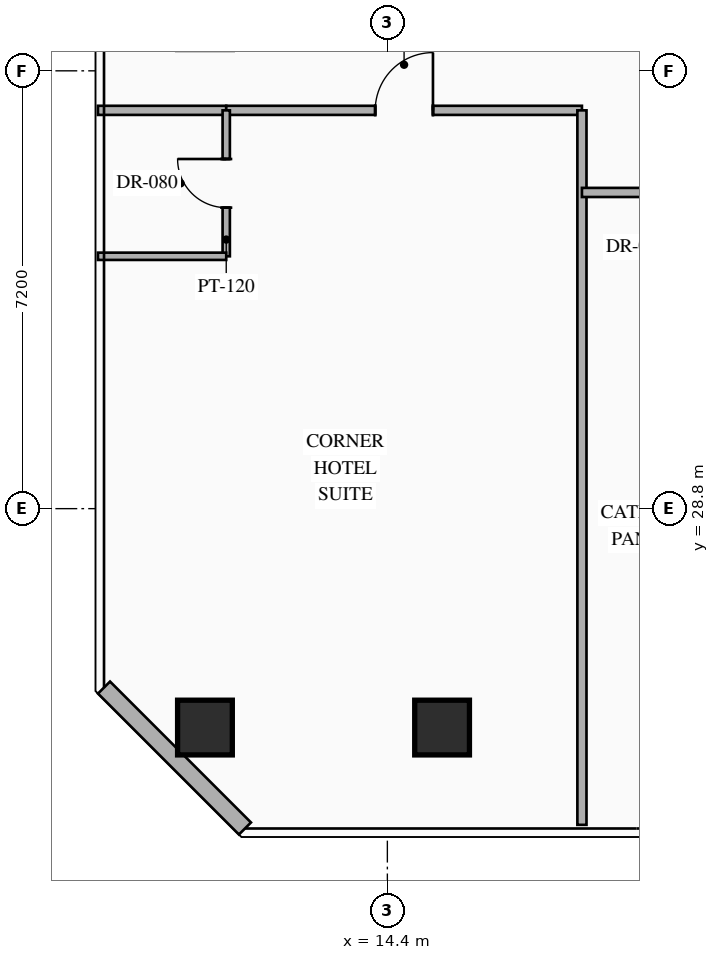
"""IFC4 building model, lengths in metres.
Left out: names, types, materials, properties, quantities, classifications, styles, units other than length and angle.
Written with IfcOpenShell. Run it as: python <this file> out.ifc"""

import sys

from ifc_helpers import new_model, si_unit, direction, frame, frame_2d, origin, origin_2d, place, context, subcontext, project, spatial, rectangle, hollow_rectangle, extrude, element, fill, save


model = new_model("IFC4")
c1 = context("Model", 3, precision=1e-05, world=origin(), true_north=direction((0.0, 1.0)))
c2 = subcontext(c1, "Body", "Model", "MODEL_VIEW")
j1 = project(units=[si_unit("LENGTHUNIT", "METRE"), si_unit("PLANEANGLEUNIT", "RADIAN")], contexts=[c1])
p1 = place(None, origin())
s1 = spatial("IfcSite", under=j1, at=p1, CompositionType="ELEMENT")
p2 = place(p1, origin())
s2 = spatial("IfcBuilding", under=s1, at=p2, CompositionType="ELEMENT")
p3 = place(p2, frame((0.0, 0.0, 84.65)))
s3 = spatial("IfcBuildingStorey", under=s2, at=p3, CompositionType="ELEMENT", Elevation=84.65)
for number, where, z_axis, x_axis in (
    (1, (11.4, 25.2, 0.0), (0.0, 0.0, 1.0), (1.0, 0.0, 0.0)),
    (2, (15.3, 25.2, 0.0), (0.0, 0.0, 1.0), (1.0, 0.0, 0.0)),
):
    element("IfcColumn", number, at=place(p3, frame(where, z_axis=z_axis, x_axis=x_axis)), inside=s3, PredefinedType="COLUMN", context=c2, shape_type="SweptSolid", body=[
        extrude(hollow_rectangle(XDim=0.9, YDim=0.9, WallThickness=0.036, at=origin_2d()), origin(), (0.0, 0.0, 1.0), 3.35),
    ])
p4 = place(p3, frame((12.058, 23.54, 0.0), z_axis=(0.0, 0.0, 1.0), x_axis=(-0.707144017911, 0.707069542501, 0.0)))
e3 = element("IfcWall", 3, at=p4, inside=s3, PredefinedType="STANDARD", context=c2, shape_type="SweptSolid", body=[
    extrude(rectangle(XDim=3.278, YDim=0.28, at=frame_2d((1.639, 0.0))), origin(), (0.0, 0.0, 1.0), 3.13),
])
p5 = place(p3, frame((9.64, 35.35, 0.0), z_axis=(0.0, 0.0, 1.0), x_axis=(1.0, 0.0, 0.0)))
e4 = element("IfcWall", 4, at=p5, inside=s3, PredefinedType="PARTITIONING", context=c2, shape_type="SweptSolid", body=[
    extrude(rectangle(XDim=2.11, YDim=0.15, at=frame_2d((1.055, 0.0))), origin(), (0.0, 0.0, 1.0), 3.13),
])
p6 = place(p3, frame((11.75, 35.35, 0.0), z_axis=(0.0, 0.0, 1.0), x_axis=(1.0, 0.0, 0.0)))
e5 = element("IfcWall", 5, at=p6, inside=s3, PredefinedType="PARTITIONING", context=c2, shape_type="SweptSolid", body=[
    extrude(rectangle(XDim=5.85, YDim=0.15, at=frame_2d((2.925, 0.0))), origin(), (0.0, 0.0, 1.0), 3.13),
])
p7 = place(p6, frame((2.45, 0.0, 0.0)))
e6 = element("IfcOpeningElement", 6, at=p7, cuts=e5, PredefinedType="OPENING", context=c2, shape_type="SweptSolid", body=[
    extrude(rectangle(XDim=0.95, YDim=2.15, at=frame_2d((0.475, 1.075))), frame((0.0, 0.085, 0.0), z_axis=(0.0, -1.0, 0.0), x_axis=(1.0, 0.0, 0.0)), (0.0, 0.0, 1.0), 0.17),
])
p8 = place(p3, frame((11.75, 32.95, 0.0), z_axis=(0.0, 0.0, 1.0), x_axis=(0.0, 1.0, 0.0)))
e7 = element("IfcWall", 7, at=p8, inside=s3, PredefinedType="PARTITIONING", context=c2, shape_type="SweptSolid", body=[
    extrude(rectangle(XDim=2.4, YDim=0.12, at=frame_2d((1.2, 0.0))), origin(), (0.0, 0.0, 1.0), 3.13),
])
p9 = place(p8, frame((0.8, 0.0, 0.0)))
e8 = element("IfcOpeningElement", 8, at=p9, cuts=e7, PredefinedType="OPENING", context=c2, shape_type="SweptSolid", body=[
    extrude(rectangle(XDim=0.8, YDim=2.06, at=frame_2d((0.4, 1.03))), frame((0.0, 0.07, 0.0), z_axis=(0.0, -1.0, 0.0), x_axis=(1.0, 0.0, 0.0)), (0.0, 0.0, 1.0), 0.14),
])
p10 = place(p3, frame((9.64, 32.95, 0.0), z_axis=(0.0, 0.0, 1.0), x_axis=(1.0, 0.0, 0.0)))
e9 = element("IfcWall", 9, at=p10, inside=s3, PredefinedType="PARTITIONING", context=c2, shape_type="SweptSolid", body=[
    extrude(rectangle(XDim=2.11, YDim=0.12, at=frame_2d((1.055, 0.0))), origin(), (0.0, 0.0, 1.0), 3.13),
])
p11 = place(p3, frame((17.6, 23.6, 0.0), z_axis=(0.0, 0.0, 1.0), x_axis=(0.0, 1.0, 0.0)))
e10 = element("IfcWall", 10, at=p11, inside=s3, PredefinedType="PARTITIONING", context=c2, shape_type="SweptSolid", body=[
    extrude(rectangle(XDim=11.75, YDim=0.15, at=frame_2d((5.875, 0.0))), origin(), (0.0, 0.0, 1.0), 3.13),
])
p12 = place(p3, frame((17.6, 34.0, 0.0), z_axis=(0.0, 0.0, 1.0), x_axis=(1.0, 0.0, 0.0)))
e11 = element("IfcWall", 11, at=p12, inside=s3, PredefinedType="PARTITIONING", context=c2, shape_type="SweptSolid", body=[
    extrude(rectangle(XDim=2.2, YDim=0.15, at=frame_2d((1.1, 0.0))), origin(), (0.0, 0.0, 1.0), 3.13),
])
p13 = place(p7, origin())
e12 = element("IfcDoor", 12, at=p13, inside=s3, OperationType="SINGLE_SWING_RIGHT", PredefinedType="DOOR", context=c2, shape_type="SweptSolid", body=[
    extrude(rectangle(XDim=0.95, YDim=2.15, at=frame_2d((0.475, 1.075))), frame((0.0, 0.025, 0.0), z_axis=(0.0, -1.0, 0.0), x_axis=(1.0, 0.0, 0.0)), (0.0, 0.0, 1.0), 0.05),
])
fill(e6, e12)
p14 = place(p9, origin())
e13 = element("IfcDoor", 13, at=p14, inside=s3, OperationType="SINGLE_SWING_RIGHT", PredefinedType="DOOR", context=c2, shape_type="SweptSolid", body=[
    extrude(rectangle(XDim=0.8, YDim=2.06, at=frame_2d((0.4, 1.03))), frame((0.0, 0.025, 0.0), z_axis=(0.0, -1.0, 0.0), x_axis=(1.0, 0.0, 0.0)), (0.0, 0.0, 1.0), 0.05),
])
fill(e8, e13)
save(model, sys.argv[1])
